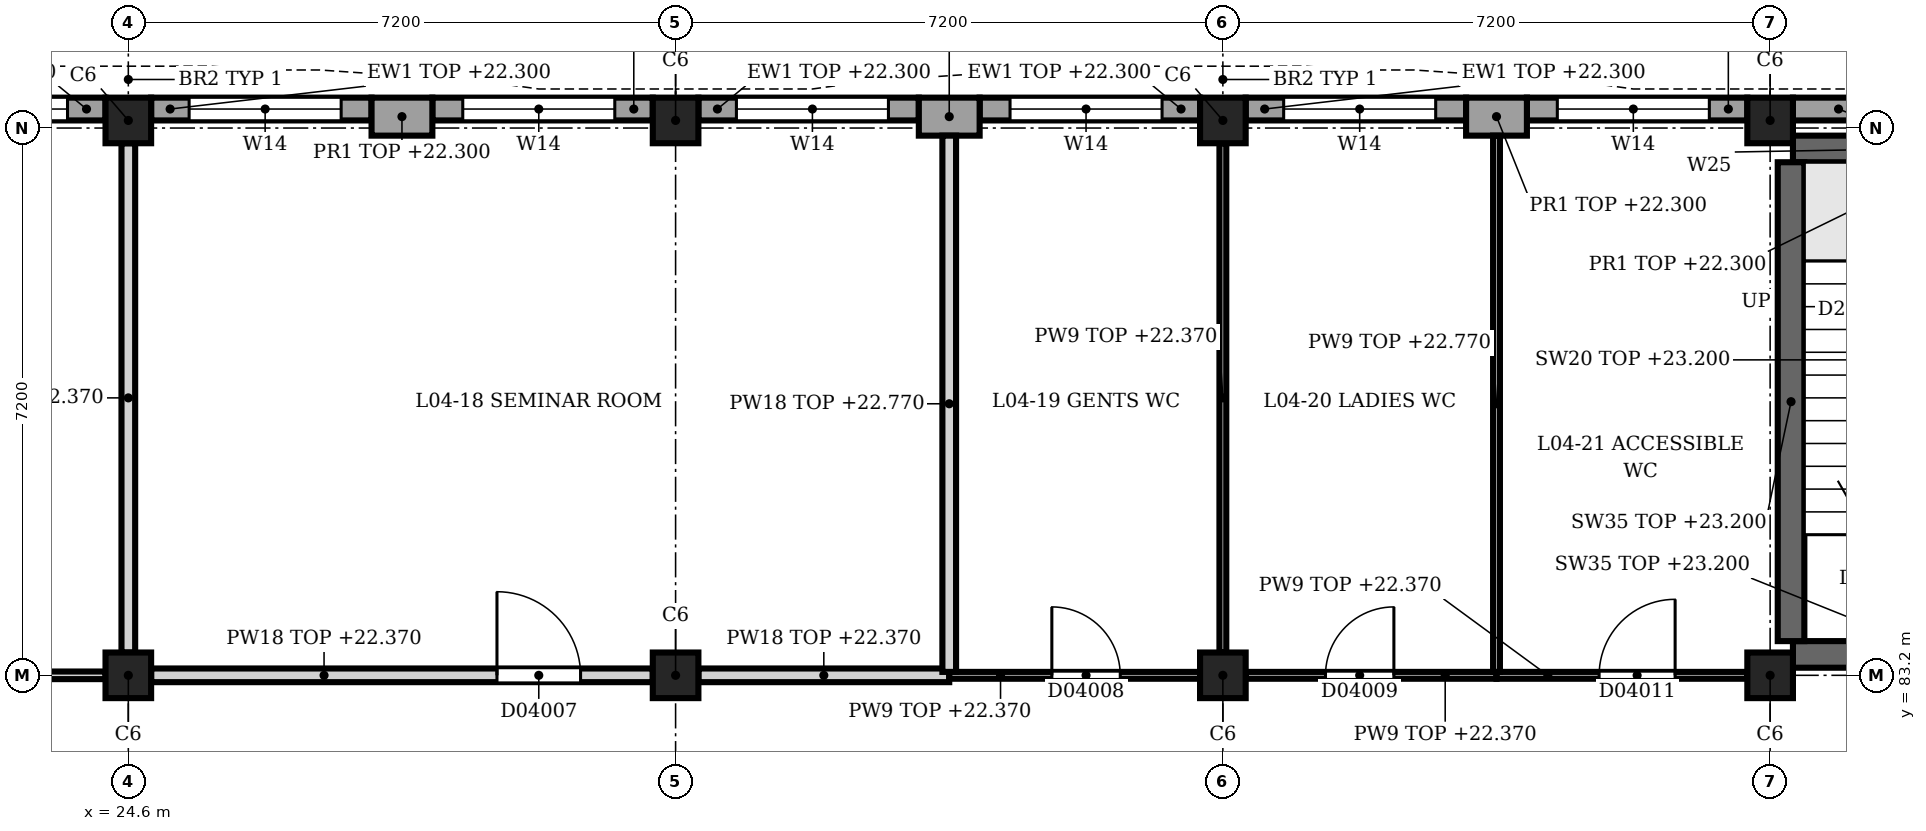
"""IFC4 building model, lengths in metres.
Left out: names, types, materials, properties, quantities, classifications, styles, units other than length and angle.
Written with IfcOpenShell. Run it as: python <this file> out.ifc"""

import sys

from ifc_helpers import new_model, si_unit, direction, frame, frame_2d, origin, origin_2d, place, context, subcontext, project, spatial, rectangle, extrude, element, fill, save


model = new_model("IFC4")
c1 = context("Model", 3, precision=1e-05, world=origin(), true_north=direction((0.0, 1.0)))
c2 = subcontext(c1, "Body", "Model", "MODEL_VIEW")
j1 = project(units=[si_unit("LENGTHUNIT", "METRE"), si_unit("PLANEANGLEUNIT", "RADIAN")], contexts=[c1])
p1 = place(None, origin())
s1 = spatial("IfcSite", under=j1, at=p1, CompositionType="ELEMENT")
p2 = place(p1, origin())
s2 = spatial("IfcBuilding", under=s1, at=p2, CompositionType="ELEMENT")
p3 = place(p2, frame((0.0, 0.0, 18.9)))
s3 = spatial("IfcBuildingStorey", under=s2, at=p3, CompositionType="ELEMENT", Elevation=18.9)
for number, where, z_axis, x_axis in (
    (1, (24.6, 83.2, 0.0), (0.0, 0.0, 1.0), (1.0, 0.0, 0.0)),
    (2, (24.6, 90.5, 0.0), (0.0, 0.0, 1.0), (1.0, 0.0, 0.0)),
    (3, (31.8, 83.2, 0.0), (0.0, 0.0, 1.0), (1.0, 0.0, 0.0)),
    (4, (31.8, 90.5, 0.0), (0.0, 0.0, 1.0), (1.0, 0.0, 0.0)),
    (5, (39.0, 83.2, 0.0), (0.0, 0.0, 1.0), (1.0, 0.0, 0.0)),
    (6, (39.0, 90.5, 0.0), (0.0, 0.0, 1.0), (1.0, 0.0, 0.0)),
    (7, (46.2, 83.2, 0.0), (0.0, 0.0, 1.0), (1.0, 0.0, 0.0)),
    (8, (46.2, 90.5, 0.0), (0.0, 0.0, 1.0), (1.0, 0.0, 0.0)),
):
    element("IfcColumn", number, at=place(p3, frame(where, z_axis=z_axis, x_axis=x_axis)), inside=s3, PredefinedType="COLUMN", context=c2, shape_type="SweptSolid", body=[
        extrude(rectangle(XDim=0.6, YDim=0.6, at=origin_2d()), origin(), (0.0, 0.0, 1.0), 4.5),
    ])
for number, where, z_axis, x_axis in (
    (9, (27.8, 90.55, 0.0), (0.0, 0.0, 1.0), (1.0, 0.0, 0.0)),
    (10, (35.0, 90.55, 0.0), (0.0, 0.0, 1.0), (1.0, 0.0, 0.0)),
    (11, (42.2, 90.55, 0.0), (0.0, 0.0, 1.0), (1.0, 0.0, 0.0)),
):
    element("IfcWall", number, at=place(p3, frame(where, z_axis=z_axis, x_axis=x_axis)), inside=s3, PredefinedType="SOLIDWALL", context=c2, shape_type="SweptSolid", body=[
        extrude(rectangle(XDim=0.8, YDim=0.5, at=frame_2d((0.4, 0.0))), origin(), (0.0, 0.0, 1.0), 3.4),
    ])
p4 = place(p3, frame((21.4, 90.65, 0.0), z_axis=(0.0, 0.0, 1.0), x_axis=(1.0, 0.0, 0.0)))
e12 = element("IfcWall", 12, at=p4, inside=s3, PredefinedType="SOLIDWALL", context=c2, shape_type="SweptSolid", body=[
    extrude(rectangle(XDim=2.9, YDim=0.3, at=frame_2d((1.45, 0.0))), origin(), (0.0, 0.0, 1.0), 3.4),
])
p5 = place(p4, frame((0.4, 0.0, 0.9)))
e13 = element("IfcOpeningElement", 13, at=p5, cuts=e12, PredefinedType="OPENING", context=c2, shape_type="SweptSolid", body=[
    extrude(rectangle(XDim=2.0, YDim=2.4, at=frame_2d((1.0, 1.2))), frame((0.0, 0.16, 0.0), z_axis=(0.0, -1.0, 0.0), x_axis=(1.0, 0.0, 0.0)), (0.0, 0.0, 1.0), 0.32),
])
p6 = place(p3, frame((24.9, 90.65, 0.0), z_axis=(0.0, 0.0, 1.0), x_axis=(1.0, 0.0, 0.0)))
e14 = element("IfcWall", 14, at=p6, inside=s3, PredefinedType="SOLIDWALL", context=c2, shape_type="SweptSolid", body=[
    extrude(rectangle(XDim=2.9, YDim=0.3, at=frame_2d((1.45, 0.0))), origin(), (0.0, 0.0, 1.0), 3.4),
])
p7 = place(p6, frame((0.5, 0.0, 0.9)))
e15 = element("IfcOpeningElement", 15, at=p7, cuts=e14, PredefinedType="OPENING", context=c2, shape_type="SweptSolid", body=[
    extrude(rectangle(XDim=2.0, YDim=2.4, at=frame_2d((1.0, 1.2))), frame((0.0, 0.16, 0.0), z_axis=(0.0, -1.0, 0.0), x_axis=(1.0, 0.0, 0.0)), (0.0, 0.0, 1.0), 0.32),
])
p8 = place(p3, frame((28.6, 90.65, 0.0), z_axis=(0.0, 0.0, 1.0), x_axis=(1.0, 0.0, 0.0)))
e16 = element("IfcWall", 16, at=p8, inside=s3, PredefinedType="SOLIDWALL", context=c2, shape_type="SweptSolid", body=[
    extrude(rectangle(XDim=2.9, YDim=0.3, at=frame_2d((1.45, 0.0))), origin(), (0.0, 0.0, 1.0), 3.4),
])
p9 = place(p8, frame((0.4, 0.0, 0.9)))
e17 = element("IfcOpeningElement", 17, at=p9, cuts=e16, PredefinedType="OPENING", context=c2, shape_type="SweptSolid", body=[
    extrude(rectangle(XDim=2.0, YDim=2.4, at=frame_2d((1.0, 1.2))), frame((0.0, 0.16, 0.0), z_axis=(0.0, -1.0, 0.0), x_axis=(1.0, 0.0, 0.0)), (0.0, 0.0, 1.0), 0.32),
])
p10 = place(p3, frame((32.1, 90.65, 0.0), z_axis=(0.0, 0.0, 1.0), x_axis=(1.0, 0.0, 0.0)))
e18 = element("IfcWall", 18, at=p10, inside=s3, PredefinedType="SOLIDWALL", context=c2, shape_type="SweptSolid", body=[
    extrude(rectangle(XDim=2.9, YDim=0.3, at=frame_2d((1.45, 0.0))), origin(), (0.0, 0.0, 1.0), 3.4),
])
p11 = place(p10, frame((0.5, 0.0, 0.9)))
e19 = element("IfcOpeningElement", 19, at=p11, cuts=e18, PredefinedType="OPENING", context=c2, shape_type="SweptSolid", body=[
    extrude(rectangle(XDim=2.0, YDim=2.4, at=frame_2d((1.0, 1.2))), frame((0.0, 0.16, 0.0), z_axis=(0.0, -1.0, 0.0), x_axis=(1.0, 0.0, 0.0)), (0.0, 0.0, 1.0), 0.32),
])
p12 = place(p3, frame((35.8, 90.65, 0.0), z_axis=(0.0, 0.0, 1.0), x_axis=(1.0, 0.0, 0.0)))
e20 = element("IfcWall", 20, at=p12, inside=s3, PredefinedType="SOLIDWALL", context=c2, shape_type="SweptSolid", body=[
    extrude(rectangle(XDim=2.9, YDim=0.3, at=frame_2d((1.45, 0.0))), origin(), (0.0, 0.0, 1.0), 3.4),
])
p13 = place(p12, frame((0.4, 0.0, 0.9)))
e21 = element("IfcOpeningElement", 21, at=p13, cuts=e20, PredefinedType="OPENING", context=c2, shape_type="SweptSolid", body=[
    extrude(rectangle(XDim=2.0, YDim=2.4, at=frame_2d((1.0, 1.2))), frame((0.0, 0.16, 0.0), z_axis=(0.0, -1.0, 0.0), x_axis=(1.0, 0.0, 0.0)), (0.0, 0.0, 1.0), 0.32),
])
p14 = place(p3, frame((39.3, 90.65, 0.0), z_axis=(0.0, 0.0, 1.0), x_axis=(1.0, 0.0, 0.0)))
e22 = element("IfcWall", 22, at=p14, inside=s3, PredefinedType="SOLIDWALL", context=c2, shape_type="SweptSolid", body=[
    extrude(rectangle(XDim=2.9, YDim=0.3, at=frame_2d((1.45, 0.0))), origin(), (0.0, 0.0, 1.0), 3.4),
])
p15 = place(p14, frame((0.5, 0.0, 0.9)))
e23 = element("IfcOpeningElement", 23, at=p15, cuts=e22, PredefinedType="OPENING", context=c2, shape_type="SweptSolid", body=[
    extrude(rectangle(XDim=2.0, YDim=2.4, at=frame_2d((1.0, 1.2))), frame((0.0, 0.16, 0.0), z_axis=(0.0, -1.0, 0.0), x_axis=(1.0, 0.0, 0.0)), (0.0, 0.0, 1.0), 0.32),
])
p16 = place(p3, frame((43.0, 90.65, 0.0), z_axis=(0.0, 0.0, 1.0), x_axis=(1.0, 0.0, 0.0)))
e24 = element("IfcWall", 24, at=p16, inside=s3, PredefinedType="SOLIDWALL", context=c2, shape_type="SweptSolid", body=[
    extrude(rectangle(XDim=2.9, YDim=0.3, at=frame_2d((1.45, 0.0))), origin(), (0.0, 0.0, 1.0), 3.4),
])
p17 = place(p16, frame((0.4, 0.0, 0.9)))
e25 = element("IfcOpeningElement", 25, at=p17, cuts=e24, PredefinedType="OPENING", context=c2, shape_type="SweptSolid", body=[
    extrude(rectangle(XDim=2.0, YDim=2.4, at=frame_2d((1.0, 1.2))), frame((0.0, 0.16, 0.0), z_axis=(0.0, -1.0, 0.0), x_axis=(1.0, 0.0, 0.0)), (0.0, 0.0, 1.0), 0.32),
])
p18 = place(p3, frame((46.5, 90.65, 0.0), z_axis=(0.0, 0.0, 1.0), x_axis=(1.0, 0.0, 0.0)))
e26 = element("IfcWall", 26, at=p18, inside=s3, PredefinedType="SOLIDWALL", context=c2, shape_type="SweptSolid", body=[
    extrude(rectangle(XDim=2.9, YDim=0.3, at=frame_2d((1.45, 0.0))), origin(), (0.0, 0.0, 1.0), 3.4),
])
p19 = place(p18, frame((1.2, 0.0, 1.2)))
e27 = element("IfcOpeningElement", 27, at=p19, cuts=e26, PredefinedType="OPENING", context=c2, shape_type="SweptSolid", body=[
    extrude(rectangle(XDim=0.6, YDim=1.8, at=frame_2d((0.3, 0.9))), frame((0.0, 0.16, 0.0), z_axis=(0.0, -1.0, 0.0), x_axis=(1.0, 0.0, 0.0)), (0.0, 0.0, 1.0), 0.32),
])
p20 = place(p3, frame((46.5, 83.475, 0.0), z_axis=(0.0, 0.0, 1.0), x_axis=(1.0, 0.0, 0.0)))
e28 = element("IfcWall", 28, at=p20, inside=s3, PredefinedType="SHEAR", context=c2, shape_type="SweptSolid", body=[
    extrude(rectangle(XDim=6.6, YDim=0.35, at=frame_2d((3.3, 0.0))), origin(), (0.0, 0.0, 1.0), 4.3),
])
p21 = place(p20, frame((3.9, 0.0, 0.0)))
e29 = element("IfcOpeningElement", 29, at=p21, cuts=e28, PredefinedType="OPENING", context=c2, shape_type="SweptSolid", body=[
    extrude(rectangle(XDim=1.2, YDim=2.1, at=frame_2d((0.6, 1.05))), frame((0.0, 0.185, 0.0), z_axis=(0.0, -1.0, 0.0), x_axis=(1.0, 0.0, 0.0)), (0.0, 0.0, 1.0), 0.37),
])
p22 = place(p3, frame((46.5, 90.125, 0.0), z_axis=(0.0, 0.0, 1.0), x_axis=(1.0, 0.0, 0.0)))
e30 = element("IfcWall", 30, at=p22, inside=s3, PredefinedType="SHEAR", context=c2, shape_type="SweptSolid", body=[
    extrude(rectangle(XDim=6.6, YDim=0.35, at=frame_2d((3.3, 0.0))), origin(), (0.0, 0.0, 1.0), 4.3),
])
p23 = place(p22, frame((1.2, 0.0, 1.2)))
e31 = element("IfcOpeningElement", 31, at=p23, cuts=e30, PredefinedType="OPENING", context=c2, shape_type="SweptSolid", body=[
    extrude(rectangle(XDim=0.6, YDim=1.8, at=frame_2d((0.3, 0.9))), frame((0.0, 0.185, 0.0), z_axis=(0.0, -1.0, 0.0), x_axis=(1.0, 0.0, 0.0)), (0.0, 0.0, 1.0), 0.37),
])
p24 = place(p3, frame((46.475, 83.65, 0.0), z_axis=(0.0, 0.0, 1.0), x_axis=(0.0, 1.0, 0.0)))
e32 = element("IfcWall", 32, at=p24, inside=s3, PredefinedType="SHEAR", context=c2, shape_type="SweptSolid", body=[
    extrude(rectangle(XDim=6.3, YDim=0.35, at=frame_2d((3.15, 0.0))), origin(), (0.0, 0.0, 1.0), 4.3),
])
p25 = place(p3, frame((17.7, 83.2, 0.0), z_axis=(0.0, 0.0, 1.0), x_axis=(1.0, 0.0, 0.0)))
e33 = element("IfcWall", 33, at=p25, inside=s3, PredefinedType="PARTITIONING", context=c2, shape_type="SweptSolid", body=[
    extrude(rectangle(XDim=6.6, YDim=0.1, at=frame_2d((3.3, 0.0))), origin(), (0.0, 0.0, 1.0), 3.47),
])
p26 = place(p3, frame((24.9, 83.2, 0.0), z_axis=(0.0, 0.0, 1.0), x_axis=(1.0, 0.0, 0.0)))
e34 = element("IfcWall", 34, at=p26, inside=s3, PredefinedType="PARTITIONING", context=c2, shape_type="SweptSolid", body=[
    extrude(rectangle(XDim=6.6, YDim=0.18, at=frame_2d((3.3, 0.0))), origin(), (0.0, 0.0, 1.0), 3.47),
])
p27 = place(p26, frame((4.55, 0.0, 0.0)))
e35 = element("IfcOpeningElement", 35, at=p27, cuts=e34, PredefinedType="OPENING", context=c2, shape_type="SweptSolid", body=[
    extrude(rectangle(XDim=1.1, YDim=2.3, at=frame_2d((0.55, 1.15))), frame((0.0, 0.1, 0.0), z_axis=(0.0, -1.0, 0.0), x_axis=(1.0, 0.0, 0.0)), (0.0, 0.0, 1.0), 0.2),
])
p28 = place(p3, frame((32.1, 83.2, 0.0), z_axis=(0.0, 0.0, 1.0), x_axis=(1.0, 0.0, 0.0)))
e36 = element("IfcWall", 36, at=p28, inside=s3, PredefinedType="PARTITIONING", context=c2, shape_type="SweptSolid", body=[
    extrude(rectangle(XDim=3.3, YDim=0.18, at=frame_2d((1.65, 0.0))), origin(), (0.0, 0.0, 1.0), 3.47),
])
p29 = place(p3, frame((35.4, 83.2, 0.0), z_axis=(0.0, 0.0, 1.0), x_axis=(1.0, 0.0, 0.0)))
e37 = element("IfcWall", 37, at=p29, inside=s3, PredefinedType="PARTITIONING", context=c2, shape_type="SweptSolid", body=[
    extrude(rectangle(XDim=3.3, YDim=0.09, at=frame_2d((1.65, 0.0))), origin(), (0.0, 0.0, 1.0), 3.47),
])
p30 = place(p29, frame((1.35, 0.0, 0.0)))
e38 = element("IfcOpeningElement", 38, at=p30, cuts=e37, PredefinedType="OPENING", context=c2, shape_type="SweptSolid", body=[
    extrude(rectangle(XDim=0.9, YDim=2.1, at=frame_2d((0.45, 1.05))), frame((0.0, 0.055, 0.0), z_axis=(0.0, -1.0, 0.0), x_axis=(1.0, 0.0, 0.0)), (0.0, 0.0, 1.0), 0.11),
])
p31 = place(p3, frame((39.3, 83.2, 0.0), z_axis=(0.0, 0.0, 1.0), x_axis=(1.0, 0.0, 0.0)))
e39 = element("IfcWall", 39, at=p31, inside=s3, PredefinedType="PARTITIONING", context=c2, shape_type="SweptSolid", body=[
    extrude(rectangle(XDim=3.3, YDim=0.09, at=frame_2d((1.65, 0.0))), origin(), (0.0, 0.0, 1.0), 3.47),
])
p32 = place(p31, frame((1.05, 0.0, 0.0)))
e40 = element("IfcOpeningElement", 40, at=p32, cuts=e39, PredefinedType="OPENING", context=c2, shape_type="SweptSolid", body=[
    extrude(rectangle(XDim=0.9, YDim=2.1, at=frame_2d((0.45, 1.05))), frame((0.0, 0.055, 0.0), z_axis=(0.0, -1.0, 0.0), x_axis=(1.0, 0.0, 0.0)), (0.0, 0.0, 1.0), 0.11),
])
p33 = place(p3, frame((42.6, 83.2, 0.0), z_axis=(0.0, 0.0, 1.0), x_axis=(1.0, 0.0, 0.0)))
e41 = element("IfcWall", 41, at=p33, inside=s3, PredefinedType="PARTITIONING", context=c2, shape_type="SweptSolid", body=[
    extrude(rectangle(XDim=3.3, YDim=0.09, at=frame_2d((1.65, 0.0))), origin(), (0.0, 0.0, 1.0), 3.47),
])
p34 = place(p33, frame((1.35, 0.0, 0.0)))
e42 = element("IfcOpeningElement", 42, at=p34, cuts=e41, PredefinedType="OPENING", context=c2, shape_type="SweptSolid", body=[
    extrude(rectangle(XDim=1.0, YDim=2.2, at=frame_2d((0.5, 1.1))), frame((0.0, 0.055, 0.0), z_axis=(0.0, -1.0, 0.0), x_axis=(1.0, 0.0, 0.0)), (0.0, 0.0, 1.0), 0.11),
])
p35 = place(p3, frame((24.6, 83.5, 0.0), z_axis=(0.0, 0.0, 1.0), x_axis=(0.0, 1.0, 0.0)))
e43 = element("IfcWall", 43, at=p35, inside=s3, PredefinedType="PARTITIONING", context=c2, shape_type="SweptSolid", body=[
    extrude(rectangle(XDim=6.7, YDim=0.18, at=frame_2d((3.35, 0.0))), origin(), (0.0, 0.0, 1.0), 3.47),
])
p36 = place(p3, frame((35.4, 83.245, 0.0), z_axis=(0.0, 0.0, 1.0), x_axis=(0.0, 1.0, 0.0)))
e44 = element("IfcWall", 44, at=p36, inside=s3, PredefinedType="PARTITIONING", context=c2, shape_type="SweptSolid", body=[
    extrude(rectangle(XDim=7.055, YDim=0.18, at=frame_2d((3.527, 0.0))), origin(), (0.0, 0.0, 1.0), 3.87),
])
p37 = place(p3, frame((39.0, 83.5, 0.0), z_axis=(0.0, 0.0, 1.0), x_axis=(0.0, 1.0, 0.0)))
e45 = element("IfcWall", 45, at=p37, inside=s3, PredefinedType="PARTITIONING", context=c2, shape_type="SweptSolid", body=[
    extrude(rectangle(XDim=6.7, YDim=0.09, at=frame_2d((3.35, 0.0))), origin(), (0.0, 0.0, 1.0), 3.47),
])
p38 = place(p3, frame((42.6, 83.245, 0.0), z_axis=(0.0, 0.0, 1.0), x_axis=(0.0, 1.0, 0.0)))
e46 = element("IfcWall", 46, at=p38, inside=s3, PredefinedType="PARTITIONING", context=c2, shape_type="SweptSolid", body=[
    extrude(rectangle(XDim=7.055, YDim=0.09, at=frame_2d((3.527, 0.0))), origin(), (0.0, 0.0, 1.0), 3.87),
])
p39 = place(p5, origin())
e47 = element("IfcWindow", 47, at=p39, inside=s3, PartitioningType="SINGLE_PANEL", PredefinedType="WINDOW", context=c2, shape_type="SweptSolid", body=[
    extrude(rectangle(XDim=2.0, YDim=2.4, at=frame_2d((1.0, 1.2))), frame((0.0, 0.03, 0.0), z_axis=(0.0, -1.0, 0.0), x_axis=(1.0, 0.0, 0.0)), (0.0, 0.0, 1.0), 0.06),
])
fill(e13, e47)
p40 = place(p7, origin())
e48 = element("IfcWindow", 48, at=p40, inside=s3, PartitioningType="SINGLE_PANEL", PredefinedType="WINDOW", context=c2, shape_type="SweptSolid", body=[
    extrude(rectangle(XDim=2.0, YDim=2.4, at=frame_2d((1.0, 1.2))), frame((0.0, 0.03, 0.0), z_axis=(0.0, -1.0, 0.0), x_axis=(1.0, 0.0, 0.0)), (0.0, 0.0, 1.0), 0.06),
])
fill(e15, e48)
p41 = place(p9, origin())
e49 = element("IfcWindow", 49, at=p41, inside=s3, PartitioningType="SINGLE_PANEL", PredefinedType="WINDOW", context=c2, shape_type="SweptSolid", body=[
    extrude(rectangle(XDim=2.0, YDim=2.4, at=frame_2d((1.0, 1.2))), frame((0.0, 0.03, 0.0), z_axis=(0.0, -1.0, 0.0), x_axis=(1.0, 0.0, 0.0)), (0.0, 0.0, 1.0), 0.06),
])
fill(e17, e49)
p42 = place(p11, origin())
e50 = element("IfcWindow", 50, at=p42, inside=s3, PartitioningType="SINGLE_PANEL", PredefinedType="WINDOW", context=c2, shape_type="SweptSolid", body=[
    extrude(rectangle(XDim=2.0, YDim=2.4, at=frame_2d((1.0, 1.2))), frame((0.0, 0.03, 0.0), z_axis=(0.0, -1.0, 0.0), x_axis=(1.0, 0.0, 0.0)), (0.0, 0.0, 1.0), 0.06),
])
fill(e19, e50)
p43 = place(p13, origin())
e51 = element("IfcWindow", 51, at=p43, inside=s3, PartitioningType="SINGLE_PANEL", PredefinedType="WINDOW", context=c2, shape_type="SweptSolid", body=[
    extrude(rectangle(XDim=2.0, YDim=2.4, at=frame_2d((1.0, 1.2))), frame((0.0, 0.03, 0.0), z_axis=(0.0, -1.0, 0.0), x_axis=(1.0, 0.0, 0.0)), (0.0, 0.0, 1.0), 0.06),
])
fill(e21, e51)
p44 = place(p15, origin())
e52 = element("IfcWindow", 52, at=p44, inside=s3, PartitioningType="SINGLE_PANEL", PredefinedType="WINDOW", context=c2, shape_type="SweptSolid", body=[
    extrude(rectangle(XDim=2.0, YDim=2.4, at=frame_2d((1.0, 1.2))), frame((0.0, 0.03, 0.0), z_axis=(0.0, -1.0, 0.0), x_axis=(1.0, 0.0, 0.0)), (0.0, 0.0, 1.0), 0.06),
])
fill(e23, e52)
p45 = place(p17, origin())
e53 = element("IfcWindow", 53, at=p45, inside=s3, PartitioningType="SINGLE_PANEL", PredefinedType="WINDOW", context=c2, shape_type="SweptSolid", body=[
    extrude(rectangle(XDim=2.0, YDim=2.4, at=frame_2d((1.0, 1.2))), frame((0.0, 0.03, 0.0), z_axis=(0.0, -1.0, 0.0), x_axis=(1.0, 0.0, 0.0)), (0.0, 0.0, 1.0), 0.06),
])
fill(e25, e53)
p46 = place(p27, origin())
e54 = element("IfcDoor", 54, at=p46, inside=s3, OperationType="SINGLE_SWING_RIGHT", PredefinedType="DOOR", context=c2, shape_type="SweptSolid", body=[
    extrude(rectangle(XDim=1.1, YDim=2.3, at=frame_2d((0.55, 1.15))), frame((0.0, 0.025, 0.0), z_axis=(0.0, -1.0, 0.0), x_axis=(1.0, 0.0, 0.0)), (0.0, 0.0, 1.0), 0.05),
])
fill(e35, e54)
p47 = place(p30, origin())
e55 = element("IfcDoor", 55, at=p47, inside=s3, OperationType="SINGLE_SWING_RIGHT", PredefinedType="DOOR", context=c2, shape_type="SweptSolid", body=[
    extrude(rectangle(XDim=0.9, YDim=2.1, at=frame_2d((0.45, 1.05))), frame((0.0, 0.025, 0.0), z_axis=(0.0, -1.0, 0.0), x_axis=(1.0, 0.0, 0.0)), (0.0, 0.0, 1.0), 0.05),
])
fill(e38, e55)
p48 = place(p32, origin())
e56 = element("IfcDoor", 56, at=p48, inside=s3, OperationType="SINGLE_SWING_LEFT", PredefinedType="DOOR", context=c2, shape_type="SweptSolid", body=[
    extrude(rectangle(XDim=0.9, YDim=2.1, at=frame_2d((0.45, 1.05))), frame((0.0, 0.025, 0.0), z_axis=(0.0, -1.0, 0.0), x_axis=(1.0, 0.0, 0.0)), (0.0, 0.0, 1.0), 0.05),
])
fill(e40, e56)
p49 = place(p34, origin())
e57 = element("IfcDoor", 57, at=p49, inside=s3, OperationType="SINGLE_SWING_RIGHT", PredefinedType="DOOR", context=c2, shape_type="SweptSolid", body=[
    extrude(rectangle(XDim=1.0, YDim=2.2, at=frame_2d((0.5, 1.1))), frame((0.0, 0.025, 0.0), z_axis=(0.0, -1.0, 0.0), x_axis=(1.0, 0.0, 0.0)), (0.0, 0.0, 1.0), 0.05),
])
fill(e42, e57)
save(model, sys.argv[1])
